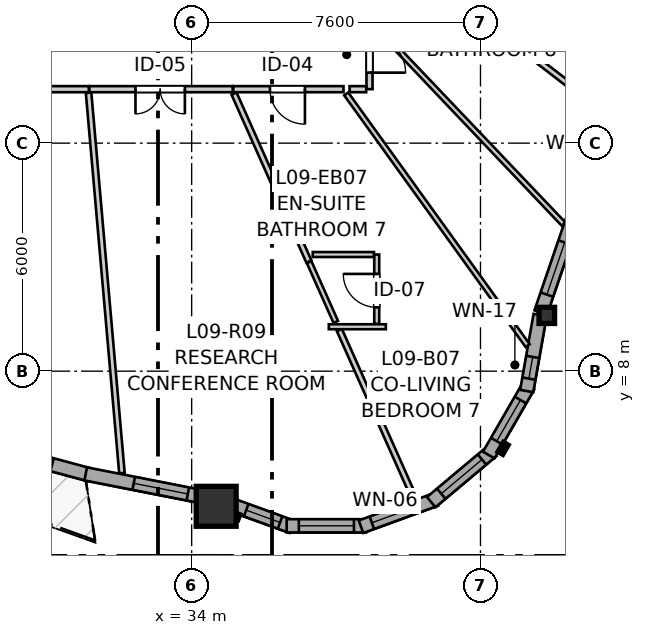
"""IFC4 building model, lengths in metres.
Left out: names, types, materials, properties, quantities, classifications, styles, units other than length and angle.
Written with IfcOpenShell. Run it as: python <this file> out.ifc"""

import sys

from ifc_helpers import new_model, si_unit, direction, frame, frame_2d, origin, origin_2d, place, context, subcontext, project, spatial, rectangle, i_section, extrude, source, transform, mapped, element, fill, save


model = new_model("IFC4")
c1 = context("Model", 3, precision=1e-05, world=origin(), true_north=direction((0.0, 1.0)))
c2 = subcontext(c1, "Body", "Model", "MODEL_VIEW")
j1 = project(units=[si_unit("LENGTHUNIT", "METRE"), si_unit("PLANEANGLEUNIT", "RADIAN")], contexts=[c1])
p1 = place(None, origin())
s1 = spatial("IfcSite", under=j1, at=p1, CompositionType="ELEMENT")
p2 = place(p1, origin())
s2 = spatial("IfcBuilding", under=s1, at=p2, CompositionType="ELEMENT")
p3 = place(p2, frame((0.0, 0.0, 33.4)))
s3 = spatial("IfcBuildingStorey", under=s2, at=p3, CompositionType="ELEMENT", Elevation=33.4)
m1 = source(origin(), c2, "Body", "SweptSolid", [
    extrude(rectangle(XDim=1.05, YDim=1.05, at=origin_2d()), origin(), (0.0, 0.0, 1.0), 2.94),
])
p4 = place(p3, frame((34.645, 4.445, 0.0), z_axis=(0.0, 0.0, 1.0), x_axis=(1.0, 0.0, 0.0)))
e1 = element("IfcColumn", 1, at=p4, inside=s3, PredefinedType="COLUMN", context=c2, shape_type="MappedRepresentation", body=[
    mapped(m1, transform((0.0, 0.0, 0.0), x_axis=(1.0, 0.0, 0.0), y_axis=(0.0, 1.0, 0.0), z_axis=(0.0, 0.0, 1.0), scale=1.0)),
])
m2 = source(origin(), c2, "Body", "SweptSolid", [
    extrude(i_section(OverallWidth=0.409, OverallDepth=0.425, WebThickness=0.03, FlangeThickness=0.048, FilletRadius=0.015, at=origin_2d()), origin(), (0.0, 0.0, 1.0), 2.94),
])
p5 = place(p3, frame((43.345, 9.468, 0.0), z_axis=(0.0, 0.0, 1.0), x_axis=(1.0, 0.0, 0.0)))
e2 = element("IfcColumn", 2, at=p5, inside=s3, PredefinedType="PILASTER", context=c2, shape_type="MappedRepresentation", body=[
    mapped(m2, transform((0.0, 0.0, 0.0), x_axis=(1.0, 0.0, 0.0), y_axis=(0.0, 1.0, 0.0), z_axis=(0.0, 0.0, 1.0), scale=1.0)),
])
p6 = place(p3, frame((27.978, 6.174, 0.0), z_axis=(0.0, 0.0, 1.0), x_axis=(0.965451765427, -0.260581827136, 0.0)))
e3 = element("IfcWall", 3, at=p6, inside=s3, PredefinedType="SOLIDWALL", context=c2, shape_type="SweptSolid", body=[
    extrude(rectangle(XDim=3.439, YDim=0.35, at=frame_2d((1.72, 0.0))), origin(), (0.0, 0.0, 1.0), 2.42),
])
p7 = place(p6, frame((0.985, 0.0, 0.82)))
e4 = element("IfcOpeningElement", 4, at=p7, cuts=e3, PredefinedType="OPENING", context=c2, shape_type="SweptSolid", body=[
    extrude(rectangle(XDim=1.45, YDim=1.25, at=frame_2d((0.725, 0.625))), frame((0.0, 0.185, 0.0), z_axis=(0.0, -1.0, 0.0), x_axis=(1.0, 0.0, 0.0)), (0.0, 0.0, 1.0), 0.37),
])
p8 = place(p3, frame((31.213, 5.298, 0.0), z_axis=(0.0, 0.0, 1.0), x_axis=(0.9812345335, -0.192818023709, 0.0)))
e5 = element("IfcWall", 5, at=p8, inside=s3, PredefinedType="SOLIDWALL", context=c2, shape_type="SweptSolid", body=[
    extrude(rectangle(XDim=3.232, YDim=0.35, at=frame_2d((1.616, 0.0))), origin(), (0.0, 0.0, 1.0), 2.42),
])
p9 = place(p8, frame((1.287, 0.0, 0.82)))
e6 = element("IfcOpeningElement", 6, at=p9, cuts=e5, PredefinedType="OPENING", context=c2, shape_type="SweptSolid", body=[
    extrude(rectangle(XDim=1.45, YDim=1.25, at=frame_2d((0.725, 0.625))), frame((0.0, 0.185, 0.0), z_axis=(0.0, -1.0, 0.0), x_axis=(1.0, 0.0, 0.0)), (0.0, 0.0, 1.0), 0.37),
])
p10 = place(p3, frame((34.987, 4.506, 0.0), z_axis=(0.0, 0.0, 1.0), x_axis=(0.939720171257, -0.341944439541, 0.0)))
e7 = element("IfcWall", 7, at=p10, inside=s3, PredefinedType="SOLIDWALL", context=c2, shape_type="SweptSolid", body=[
    extrude(rectangle(XDim=1.752, YDim=0.35, at=frame_2d((0.876, 0.0))), origin(), (0.0, 0.0, 1.0), 2.42),
])
p11 = place(p10, frame((0.476, 0.0, 0.82)))
e8 = element("IfcOpeningElement", 8, at=p11, cuts=e7, PredefinedType="OPENING", context=c2, shape_type="SweptSolid", body=[
    extrude(rectangle(XDim=0.95, YDim=1.35, at=frame_2d((0.475, 0.675))), frame((0.0, 0.185, 0.0), z_axis=(0.0, -1.0, 0.0), x_axis=(1.0, 0.0, 0.0)), (0.0, 0.0, 1.0), 0.37),
])
p12 = place(p3, frame((36.5, 3.931, 0.0), z_axis=(0.0, 0.0, 1.0), x_axis=(1.0, 0.0, 0.0)))
e9 = element("IfcWall", 9, at=p12, inside=s3, PredefinedType="SOLIDWALL", context=c2, shape_type="SweptSolid", body=[
    extrude(rectangle(XDim=2.09, YDim=0.35, at=frame_2d((1.045, 0.0))), origin(), (0.0, 0.0, 1.0), 2.42),
])
p13 = place(p12, frame((0.32, 0.0, 0.82)))
e10 = element("IfcOpeningElement", 10, at=p13, cuts=e9, PredefinedType="OPENING", context=c2, shape_type="SweptSolid", body=[
    extrude(rectangle(XDim=1.45, YDim=1.25, at=frame_2d((0.725, 0.625))), frame((0.0, 0.185, 0.0), z_axis=(0.0, -1.0, 0.0), x_axis=(1.0, 0.0, 0.0)), (0.0, 0.0, 1.0), 0.37),
])
p14 = place(p3, frame((38.457, 3.907, 0.0), z_axis=(0.0, 0.0, 1.0), x_axis=(0.939711556618, 0.341968113072, 0.0)))
e11 = element("IfcWall", 11, at=p14, inside=s3, PredefinedType="SOLIDWALL", context=c2, shape_type="SweptSolid", body=[
    extrude(rectangle(XDim=2.09, YDim=0.35, at=frame_2d((1.045, 0.0))), origin(), (0.0, 0.0, 1.0), 2.42),
])
p15 = place(p14, frame((0.304, 0.0, 0.82)))
e12 = element("IfcOpeningElement", 12, at=p15, cuts=e11, PredefinedType="OPENING", context=c2, shape_type="SweptSolid", body=[
    extrude(rectangle(XDim=1.05, YDim=1.45, at=frame_2d((0.525, 0.725))), frame((0.0, 0.185, 0.0), z_axis=(0.0, -1.0, 0.0), x_axis=(1.0, 0.0, 0.0)), (0.0, 0.0, 1.0), 0.37),
])
p16 = place(p3, frame((40.303, 4.554, 0.0), z_axis=(0.0, 0.0, 1.0), x_axis=(0.766024572719, 0.642811289563, 0.0)))
e13 = element("IfcWall", 13, at=p16, inside=s3, PredefinedType="SOLIDWALL", context=c2, shape_type="SweptSolid", body=[
    extrude(rectangle(XDim=2.09, YDim=0.35, at=frame_2d((1.045, 0.0))), origin(), (0.0, 0.0, 1.0), 2.42),
])
p17 = place(p16, frame((0.345, 0.0, 0.82)))
e14 = element("IfcOpeningElement", 14, at=p17, cuts=e13, PredefinedType="OPENING", context=c2, shape_type="SweptSolid", body=[
    extrude(rectangle(XDim=1.4, YDim=1.35, at=frame_2d((0.7, 0.675))), frame((0.0, 0.185, 0.0), z_axis=(0.0, -1.0, 0.0), x_axis=(1.0, 0.0, 0.0)), (0.0, 0.0, 1.0), 0.37),
])
p18 = place(p3, frame((41.817, 5.794, 0.0), z_axis=(0.0, 0.0, 1.0), x_axis=(0.499995423472, 0.866028046028, 0.0)))
e15 = element("IfcWall", 15, at=p18, inside=s3, PredefinedType="SOLIDWALL", context=c2, shape_type="SweptSolid", body=[
    extrude(rectangle(XDim=2.09, YDim=0.35, at=frame_2d((1.045, 0.0))), origin(), (0.0, 0.0, 1.0), 2.42),
])
p19 = place(p18, frame((0.42, 0.0, 0.82)))
e16 = element("IfcOpeningElement", 16, at=p19, cuts=e15, PredefinedType="OPENING", context=c2, shape_type="SweptSolid", body=[
    extrude(rectangle(XDim=1.25, YDim=1.35, at=frame_2d((0.625, 0.675))), frame((0.0, 0.185, 0.0), z_axis=(0.0, -1.0, 0.0), x_axis=(1.0, 0.0, 0.0)), (0.0, 0.0, 1.0), 0.37),
])
p20 = place(p3, frame((42.816, 7.477, 0.0), z_axis=(0.0, 0.0, 1.0), x_axis=(0.173586593252, 0.984818610021, 0.0)))
e17 = element("IfcWall", 17, at=p20, inside=s3, PredefinedType="SOLIDWALL", context=c2, shape_type="SweptSolid", body=[
    extrude(rectangle(XDim=2.032, YDim=0.35, at=frame_2d((1.016, 0.0))), origin(), (0.0, 0.0, 1.0), 2.42),
])
p21 = place(p20, frame((0.332, 0.0, 0.82)))
e18 = element("IfcOpeningElement", 18, at=p21, cuts=e17, PredefinedType="OPENING", context=c2, shape_type="SweptSolid", body=[
    extrude(rectangle(XDim=0.58, YDim=1.35, at=frame_2d((0.29, 0.675))), frame((0.0, 0.185, 0.0), z_axis=(0.0, -1.0, 0.0), x_axis=(1.0, 0.0, 0.0)), (0.0, 0.0, 1.0), 0.37),
])
p22 = place(p3, frame((43.186, 9.543, 0.0), z_axis=(0.0, 0.0, 1.0), x_axis=(0.323620542135, 0.946186950189, 0.0)))
e19 = element("IfcWall", 19, at=p22, inside=s3, PredefinedType="SOLIDWALL", context=c2, shape_type="SweptSolid", body=[
    extrude(rectangle(XDim=3.512, YDim=0.35, at=frame_2d((1.756, 0.0))), origin(), (0.0, 0.0, 1.0), 2.42),
])
p23 = place(p22, frame((0.498, 0.0, 0.82)))
e20 = element("IfcOpeningElement", 20, at=p23, cuts=e19, PredefinedType="OPENING", context=c2, shape_type="SweptSolid", body=[
    extrude(rectangle(XDim=1.45, YDim=1.25, at=frame_2d((0.725, 0.625))), frame((0.0, 0.185, 0.0), z_axis=(0.0, -1.0, 0.0), x_axis=(1.0, 0.0, 0.0)), (0.0, 0.0, 1.0), 0.37),
])
p24 = place(p22, frame((2.619, 0.0, 0.82)))
e21 = element("IfcOpeningElement", 21, at=p24, cuts=e19, PredefinedType="OPENING", context=c2, shape_type="SweptSolid", body=[
    extrude(rectangle(XDim=0.58, YDim=1.35, at=frame_2d((0.29, 0.675))), frame((0.0, 0.185, 0.0), z_axis=(0.0, -1.0, 0.0), x_axis=(1.0, 0.0, 0.0)), (0.0, 0.0, 1.0), 0.37),
])
p25 = place(p3, frame((31.294, 15.42, 0.0), z_axis=(0.0, 0.0, 1.0), x_axis=(-1.0, 0.0, 0.0)))
e22 = element("IfcWall", 22, at=p25, inside=s3, PredefinedType="PARTITIONING", context=c2, shape_type="SweptSolid", body=[
    extrude(rectangle(XDim=5.554, YDim=0.16, at=frame_2d((2.777, 0.0))), origin(), (0.0, 0.0, 1.0), 2.94),
])
p26 = place(p25, frame((2.126, 0.0, 0.0)))
e23 = element("IfcOpeningElement", 23, at=p26, cuts=e22, PredefinedType="OPENING", context=c2, shape_type="SweptSolid", body=[
    extrude(rectangle(XDim=1.3, YDim=2.1, at=frame_2d((0.65, 1.05))), frame((0.0, 0.09, 0.0), z_axis=(0.0, -1.0, 0.0), x_axis=(1.0, 0.0, 0.0)), (0.0, 0.0, 1.0), 0.18),
])
p27 = place(p3, frame((35.08, 15.42, 0.0), z_axis=(0.0, 0.0, 1.0), x_axis=(-1.0, 0.0, 0.0)))
e24 = element("IfcWall", 24, at=p27, inside=s3, PredefinedType="PARTITIONING", context=c2, shape_type="SweptSolid", body=[
    extrude(rectangle(XDim=3.771, YDim=0.16, at=frame_2d((1.885, 0.0))), origin(), (0.0, 0.0, 1.0), 2.94),
])
p28 = place(p27, frame((1.259, 0.0, 0.0)))
e25 = element("IfcOpeningElement", 25, at=p28, cuts=e24, PredefinedType="OPENING", context=c2, shape_type="SweptSolid", body=[
    extrude(rectangle(XDim=1.3, YDim=2.1, at=frame_2d((0.65, 1.05))), frame((0.0, 0.09, 0.0), z_axis=(0.0, -1.0, 0.0), x_axis=(1.0, 0.0, 0.0)), (0.0, 0.0, 1.0), 0.18),
])
p29 = place(p3, frame((37.995, 15.42, 0.0), z_axis=(0.0, 0.0, 1.0), x_axis=(-1.0, 0.0, 0.0)))
e26 = element("IfcWall", 26, at=p29, inside=s3, PredefinedType="PARTITIONING", context=c2, shape_type="SweptSolid", body=[
    extrude(rectangle(XDim=2.9, YDim=0.16, at=frame_2d((1.45, 0.0))), origin(), (0.0, 0.0, 1.0), 2.94),
])
p30 = place(p29, frame((1.014, 0.0, 0.0)))
e27 = element("IfcOpeningElement", 27, at=p30, cuts=e26, PredefinedType="OPENING", context=c2, shape_type="SweptSolid", body=[
    extrude(rectangle(XDim=0.92, YDim=2.1, at=frame_2d((0.46, 1.05))), frame((0.0, 0.09, 0.0), z_axis=(0.0, -1.0, 0.0), x_axis=(1.0, 0.0, 0.0)), (0.0, 0.0, 1.0), 0.18),
])
p31 = place(p3, frame((38.87, 9.242, 0.0), z_axis=(0.0, 0.0, 1.0), x_axis=(0.0, 1.0, 0.0)))
e28 = element("IfcWall", 28, at=p31, inside=s3, PredefinedType="PARTITIONING", context=c2, shape_type="SweptSolid", body=[
    extrude(rectangle(XDim=1.827, YDim=0.13, at=frame_2d((0.914, 0.0))), origin(), (0.0, 0.0, 1.0), 2.94),
])
p32 = place(p31, frame((0.437, 0.0, 0.0)))
e29 = element("IfcOpeningElement", 29, at=p32, cuts=e28, PredefinedType="OPENING", context=c2, shape_type="SweptSolid", body=[
    extrude(rectangle(XDim=0.88, YDim=2.05, at=frame_2d((0.44, 1.025))), frame((0.0, 0.075, 0.0), z_axis=(0.0, -1.0, 0.0), x_axis=(1.0, 0.0, 0.0)), (0.0, 0.0, 1.0), 0.15),
])
p33 = place(p3, frame((38.68, 17.203, 0.0), z_axis=(0.0, 0.0, 1.0), x_axis=(0.0, -1.0, 0.0)))
e30 = element("IfcWall", 30, at=p33, inside=s3, PredefinedType="PARTITIONING", context=c2, shape_type="SweptSolid", body=[
    extrude(rectangle(XDim=1.783, YDim=0.16, at=frame_2d((0.892, 0.0))), origin(), (0.0, 0.0, 1.0), 2.94),
])
p34 = place(p33, frame((0.398, 0.0, 0.0)))
e31 = element("IfcOpeningElement", 31, at=p34, cuts=e30, PredefinedType="OPENING", context=c2, shape_type="SweptSolid", body=[
    extrude(rectangle(XDim=0.95, YDim=2.1, at=frame_2d((0.475, 1.05))), frame((0.0, 0.09, 0.0), z_axis=(0.0, -1.0, 0.0), x_axis=(1.0, 0.0, 0.0)), (0.0, 0.0, 1.0), 0.18),
])
p35 = place(p3, frame((31.287, 15.326, 0.0), z_axis=(0.0, 0.0, 1.0), x_axis=(0.087404477037, -0.99617290537, 0.0)))
e32 = element("IfcWall", 32, at=p35, inside=s3, PredefinedType="PARTITIONING", context=c2, shape_type="SweptSolid", body=[
    extrude(rectangle(XDim=10.047, YDim=0.145, at=frame_2d((5.023, 0.0))), origin(), (0.0, 0.0, 1.0), 2.94),
])
p36 = place(p3, frame((38.067, 15.295, 0.0), z_axis=(0.0, 0.0, 1.0), x_axis=(0.584777320582, -0.811193864211, 0.0)))
e33 = element("IfcWall", 33, at=p36, inside=s3, PredefinedType="PARTITIONING", context=c2, shape_type="SweptSolid", body=[
    extrude(rectangle(XDim=8.164, YDim=0.13, at=frame_2d((4.082, 0.0))), origin(), (0.0, 0.0, 1.0), 2.94),
])
p37 = place(p3, frame((38.812, 17.101, 0.0), z_axis=(0.0, 0.0, 1.0), x_axis=(0.689140556814, -0.724627692649, 0.0)))
e34 = element("IfcWall", 34, at=p37, inside=s3, PredefinedType="PARTITIONING", context=c2, shape_type="SweptSolid", body=[
    extrude(rectangle(XDim=7.217, YDim=0.13, at=frame_2d((3.608, 0.0))), origin(), (0.0, 0.0, 1.0), 2.94),
])
p38 = place(p3, frame((40.649, 18.066, 0.0), z_axis=(0.0, 0.0, 1.0), x_axis=(0.792155051101, -0.610319895641, 0.0)))
e35 = element("IfcWall", 35, at=p38, inside=s3, PredefinedType="PARTITIONING", context=c2, shape_type="SweptSolid", body=[
    extrude(rectangle(XDim=5.093, YDim=0.145, at=frame_2d((2.546, 0.0))), origin(), (0.0, 0.0, 1.0), 2.94),
])
p39 = place(p3, frame((37.887, 9.082, 0.0), z_axis=(0.0, 0.0, 1.0), x_axis=(0.406941066305, -0.913454415149, 0.0)))
e36 = element("IfcWall", 36, at=p39, inside=s3, PredefinedType="PARTITIONING", context=c2, shape_type="SweptSolid", body=[
    extrude(rectangle(XDim=4.882, YDim=0.145, at=frame_2d((2.441, 0.0))), origin(), (0.0, 0.0, 1.0), 2.94),
])
p40 = place(p3, frame((35.116, 15.303, 0.0), z_axis=(0.0, 0.0, 1.0), x_axis=(0.406910733823, -0.913467927571, 0.0)))
e37 = element("IfcWall", 37, at=p40, inside=s3, PredefinedType="PARTITIONING", context=c2, shape_type="SweptSolid", body=[
    extrude(rectangle(XDim=4.839, YDim=0.145, at=frame_2d((2.419, 0.0))), origin(), (0.0, 0.0, 1.0), 2.94),
])
p41 = place(p3, frame((37.091, 10.869, 0.0), z_axis=(0.0, 0.0, 1.0), x_axis=(0.406835672622, -0.913501360416, 0.0)))
e38 = element("IfcWall", 38, at=p41, inside=s3, PredefinedType="PARTITIONING", context=c2, shape_type="SweptSolid", body=[
    extrude(rectangle(XDim=1.722, YDim=0.13, at=frame_2d((0.861, 0.0))), origin(), (0.0, 0.0, 1.0), 2.94),
])
p42 = place(p3, frame((37.186, 11.069, 0.0), z_axis=(0.0, 0.0, 1.0), x_axis=(1.0, 0.0, 0.0)))
e39 = element("IfcWall", 39, at=p42, inside=s3, PredefinedType="PARTITIONING", context=c2, shape_type="SweptSolid", body=[
    extrude(rectangle(XDim=1.611, YDim=0.13, at=frame_2d((0.805, 0.0))), origin(), (0.0, 0.0, 1.0), 2.94),
])
p43 = place(p3, frame((37.609, 9.169, 0.0), z_axis=(0.0, 0.0, 1.0), x_axis=(1.0, 0.0, 0.0)))
e40 = element("IfcWall", 40, at=p43, inside=s3, PredefinedType="PARTITIONING", context=c2, shape_type="SweptSolid", body=[
    extrude(rectangle(XDim=1.501, YDim=0.13, at=frame_2d((0.75, 0.0))), origin(), (0.0, 0.0, 1.0), 2.94),
])
p44 = place(p3, frame((38.156, 15.42, 0.0), z_axis=(0.0, 0.0, 1.0), x_axis=(1.0, 0.0, 0.0)))
e41 = element("IfcWall", 41, at=p44, inside=s3, PredefinedType="PARTITIONING", context=c2, shape_type="SweptSolid", body=[
    extrude(rectangle(XDim=0.436, YDim=0.16, at=frame_2d((0.218, 0.0))), origin(), (0.0, 0.0, 1.0), 2.94),
])
m3 = source(origin(), c2, "Body", "SweptSolid", [
    extrude(rectangle(XDim=1.45, YDim=1.25, at=frame_2d((0.725, 0.625))), frame((0.0, 0.03, 0.0), z_axis=(0.0, -1.0, 0.0), x_axis=(1.0, 0.0, 0.0)), (0.0, 0.0, 1.0), 0.06),
])
p45 = place(p7, origin())
e42 = element("IfcWindow", 42, at=p45, inside=s3, PartitioningType="SINGLE_PANEL", PredefinedType="WINDOW", context=c2, shape_type="MappedRepresentation", body=[
    mapped(m3, transform((0.0, 0.0, 0.0), x_axis=(1.0, 0.0, 0.0), y_axis=(0.0, 1.0, 0.0), z_axis=(0.0, 0.0, 1.0), scale=1.0)),
])
fill(e4, e42)
p46 = place(p9, origin())
e43 = element("IfcWindow", 43, at=p46, inside=s3, PartitioningType="SINGLE_PANEL", PredefinedType="WINDOW", context=c2, shape_type="MappedRepresentation", body=[
    mapped(m3, transform((0.0, 0.0, 0.0), x_axis=(1.0, 0.0, 0.0), y_axis=(0.0, 1.0, 0.0), z_axis=(0.0, 0.0, 1.0), scale=1.0)),
])
fill(e6, e43)
m4 = source(origin(), c2, "Body", "SweptSolid", [
    extrude(rectangle(XDim=0.95, YDim=1.35, at=frame_2d((0.475, 0.675))), frame((0.0, 0.03, 0.0), z_axis=(0.0, -1.0, 0.0), x_axis=(1.0, 0.0, 0.0)), (0.0, 0.0, 1.0), 0.06),
])
p47 = place(p11, origin())
e44 = element("IfcWindow", 44, at=p47, inside=s3, PartitioningType="SINGLE_PANEL", PredefinedType="WINDOW", context=c2, shape_type="MappedRepresentation", body=[
    mapped(m4, transform((0.0, 0.0, 0.0), x_axis=(1.0, 0.0, 0.0), y_axis=(0.0, 1.0, 0.0), z_axis=(0.0, 0.0, 1.0), scale=1.0)),
])
fill(e8, e44)
p48 = place(p13, origin())
e45 = element("IfcWindow", 45, at=p48, inside=s3, PartitioningType="SINGLE_PANEL", PredefinedType="WINDOW", context=c2, shape_type="MappedRepresentation", body=[
    mapped(m3, transform((0.0, 0.0, 0.0), x_axis=(1.0, 0.0, 0.0), y_axis=(0.0, 1.0, 0.0), z_axis=(0.0, 0.0, 1.0), scale=1.0)),
])
fill(e10, e45)
m5 = source(origin(), c2, "Body", "SweptSolid", [
    extrude(rectangle(XDim=1.05, YDim=1.45, at=frame_2d((0.525, 0.725))), frame((0.0, 0.03, 0.0), z_axis=(0.0, -1.0, 0.0), x_axis=(1.0, 0.0, 0.0)), (0.0, 0.0, 1.0), 0.06),
])
p49 = place(p15, origin())
e46 = element("IfcWindow", 46, at=p49, inside=s3, PartitioningType="SINGLE_PANEL", PredefinedType="WINDOW", context=c2, shape_type="MappedRepresentation", body=[
    mapped(m5, transform((0.0, 0.0, 0.0), x_axis=(1.0, 0.0, 0.0), y_axis=(0.0, 1.0, 0.0), z_axis=(0.0, 0.0, 1.0), scale=1.0)),
])
fill(e12, e46)
m6 = source(origin(), c2, "Body", "SweptSolid", [
    extrude(rectangle(XDim=1.4, YDim=1.35, at=frame_2d((0.7, 0.675))), frame((0.0, 0.03, 0.0), z_axis=(0.0, -1.0, 0.0), x_axis=(1.0, 0.0, 0.0)), (0.0, 0.0, 1.0), 0.06),
])
p50 = place(p17, origin())
e47 = element("IfcWindow", 47, at=p50, inside=s3, PartitioningType="SINGLE_PANEL", PredefinedType="WINDOW", context=c2, shape_type="MappedRepresentation", body=[
    mapped(m6, transform((0.0, 0.0, 0.0), x_axis=(1.0, 0.0, 0.0), y_axis=(0.0, 1.0, 0.0), z_axis=(0.0, 0.0, 1.0), scale=1.0)),
])
fill(e14, e47)
m7 = source(origin(), c2, "Body", "SweptSolid", [
    extrude(rectangle(XDim=1.25, YDim=1.35, at=frame_2d((0.625, 0.675))), frame((0.0, 0.03, 0.0), z_axis=(0.0, -1.0, 0.0), x_axis=(1.0, 0.0, 0.0)), (0.0, 0.0, 1.0), 0.06),
])
p51 = place(p19, origin())
e48 = element("IfcWindow", 48, at=p51, inside=s3, PartitioningType="SINGLE_PANEL", PredefinedType="WINDOW", context=c2, shape_type="MappedRepresentation", body=[
    mapped(m7, transform((0.0, 0.0, 0.0), x_axis=(1.0, 0.0, 0.0), y_axis=(0.0, 1.0, 0.0), z_axis=(0.0, 0.0, 1.0), scale=1.0)),
])
fill(e16, e48)
m8 = source(origin(), c2, "Body", "SweptSolid", [
    extrude(rectangle(XDim=0.58, YDim=1.35, at=frame_2d((0.29, 0.675))), frame((0.0, 0.03, 0.0), z_axis=(0.0, -1.0, 0.0), x_axis=(1.0, 0.0, 0.0)), (0.0, 0.0, 1.0), 0.06),
])
p52 = place(p21, origin())
e49 = element("IfcWindow", 49, at=p52, inside=s3, PartitioningType="SINGLE_PANEL", PredefinedType="WINDOW", context=c2, shape_type="MappedRepresentation", body=[
    mapped(m8, transform((0.0, 0.0, 0.0), x_axis=(1.0, 0.0, 0.0), y_axis=(0.0, 1.0, 0.0), z_axis=(0.0, 0.0, 1.0), scale=1.0)),
])
fill(e18, e49)
p53 = place(p23, origin())
e50 = element("IfcWindow", 50, at=p53, inside=s3, PartitioningType="SINGLE_PANEL", PredefinedType="WINDOW", context=c2, shape_type="MappedRepresentation", body=[
    mapped(m3, transform((0.0, 0.0, 0.0), x_axis=(1.0, 0.0, 0.0), y_axis=(0.0, 1.0, 0.0), z_axis=(0.0, 0.0, 1.0), scale=1.0)),
])
fill(e20, e50)
m9 = source(origin(), c2, "Body", "SweptSolid", [
    extrude(rectangle(XDim=1.3, YDim=2.1, at=frame_2d((0.65, 1.05))), frame((0.0, 0.025, 0.0), z_axis=(0.0, -1.0, 0.0), x_axis=(1.0, 0.0, 0.0)), (0.0, 0.0, 1.0), 0.05),
])
p54 = place(p28, origin())
e51 = element("IfcDoor", 51, at=p54, inside=s3, OperationType="DOUBLE_DOOR_SINGLE_SWING", PredefinedType="DOOR", context=c2, shape_type="MappedRepresentation", body=[
    mapped(m9, transform((0.0, 0.0, 0.0), x_axis=(1.0, 0.0, 0.0), y_axis=(0.0, 1.0, 0.0), z_axis=(0.0, 0.0, 1.0), scale=1.0)),
])
fill(e25, e51)
m10 = source(origin(), c2, "Body", "SweptSolid", [
    extrude(rectangle(XDim=0.92, YDim=2.1, at=frame_2d((0.46, 1.05))), frame((0.0, 0.025, 0.0), z_axis=(0.0, -1.0, 0.0), x_axis=(1.0, 0.0, 0.0)), (0.0, 0.0, 1.0), 0.05),
])
p55 = place(p30, origin())
e52 = element("IfcDoor", 52, at=p55, inside=s3, OperationType="SINGLE_SWING_LEFT", PredefinedType="DOOR", context=c2, shape_type="MappedRepresentation", body=[
    mapped(m10, transform((0.0, 0.0, 0.0), x_axis=(1.0, 0.0, 0.0), y_axis=(0.0, 1.0, 0.0), z_axis=(0.0, 0.0, 1.0), scale=1.0)),
])
fill(e27, e52)
m11 = source(origin(), c2, "Body", "SweptSolid", [
    extrude(rectangle(XDim=0.88, YDim=2.05, at=frame_2d((0.44, 1.025))), frame((0.0, 0.025, 0.0), z_axis=(0.0, -1.0, 0.0), x_axis=(1.0, 0.0, 0.0)), (0.0, 0.0, 1.0), 0.05),
])
p56 = place(p32, origin())
e53 = element("IfcDoor", 53, at=p56, inside=s3, OperationType="SINGLE_SWING_RIGHT", PredefinedType="DOOR", context=c2, shape_type="MappedRepresentation", body=[
    mapped(m11, transform((0.0, 0.0, 0.0), x_axis=(1.0, 0.0, 0.0), y_axis=(0.0, 1.0, 0.0), z_axis=(0.0, 0.0, 1.0), scale=1.0)),
])
fill(e29, e53)
m12 = source(origin(), c2, "Body", "SweptSolid", [
    extrude(rectangle(XDim=0.95, YDim=2.1, at=frame_2d((0.475, 1.05))), frame((0.0, 0.025, 0.0), z_axis=(0.0, -1.0, 0.0), x_axis=(1.0, 0.0, 0.0)), (0.0, 0.0, 1.0), 0.05),
])
p57 = place(p34, origin())
e54 = element("IfcDoor", 54, at=p57, inside=s3, OperationType="SINGLE_SWING_RIGHT", PredefinedType="DOOR", context=c2, shape_type="MappedRepresentation", body=[
    mapped(m12, transform((0.0, 0.0, 0.0), x_axis=(1.0, 0.0, 0.0), y_axis=(0.0, 1.0, 0.0), z_axis=(0.0, 0.0, 1.0), scale=1.0)),
])
fill(e31, e54)
save(model, sys.argv[1])
